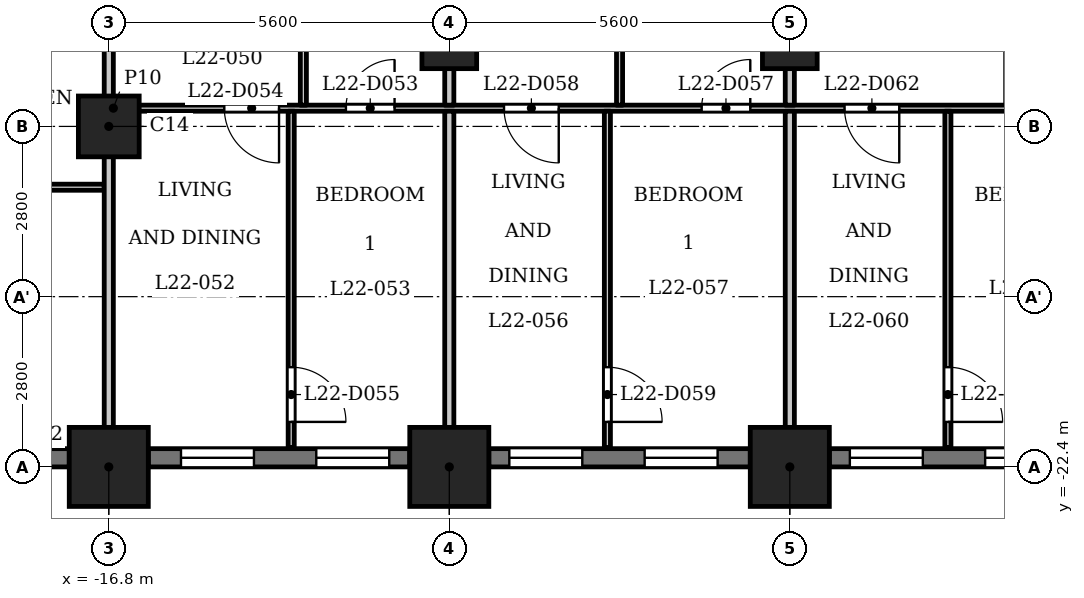
"""IFC4 building model, lengths in metres.
Left out: names, types, materials, properties, quantities, classifications, styles, units other than length and angle.
Written with IfcOpenShell. Run it as: python <this file> out.ifc"""

import sys

from ifc_helpers import new_model, si_unit, direction, frame, frame_2d, origin, origin_2d, place, context, subcontext, project, spatial, rectangle, extrude, element, fill, save


model = new_model("IFC4")
c1 = context("Model", 3, precision=1e-05, world=origin(), true_north=direction((0.0, 1.0)))
c2 = subcontext(c1, "Body", "Model", "MODEL_VIEW")
j1 = project(units=[si_unit("LENGTHUNIT", "METRE"), si_unit("PLANEANGLEUNIT", "RADIAN")], contexts=[c1])
p1 = place(None, origin())
s1 = spatial("IfcSite", under=j1, at=p1, CompositionType="ELEMENT")
p2 = place(p1, origin())
s2 = spatial("IfcBuilding", under=s1, at=p2, CompositionType="ELEMENT")
p3 = place(p2, frame((0.0, 0.0, 90.3)))
s3 = spatial("IfcBuildingStorey", under=s2, at=p3, CompositionType="ELEMENT", Elevation=90.3)
for number, where, z_axis, x_axis in (
    (1, (-16.8, -22.4, 0.0), (0.0, 0.0, 1.0), (1.0, 0.0, 0.0)),
    (2, (-11.2, -22.4, 0.0), (0.0, 0.0, 1.0), (1.0, 0.0, 0.0)),
    (3, (-5.6, -22.4, 0.0), (0.0, 0.0, 1.0), (1.0, 0.0, 0.0)),
):
    element("IfcColumn", number, at=place(p3, frame(where, z_axis=z_axis, x_axis=x_axis)), inside=s3, PredefinedType="COLUMN", context=c2, shape_type="SweptSolid", body=[
        extrude(rectangle(XDim=1.3, YDim=1.3, at=origin_2d()), origin(), (0.0, 0.0, 1.0), 3.5),
    ])
p4 = place(p3, frame((-16.8, -16.8, 0.0), z_axis=(0.0, 0.0, 1.0), x_axis=(1.0, 0.0, 0.0)))
e4 = element("IfcColumn", 4, at=p4, inside=s3, PredefinedType="COLUMN", context=c2, shape_type="SweptSolid", body=[
    extrude(rectangle(XDim=1.0, YDim=1.0, at=origin_2d()), origin(), (0.0, 0.0, 1.0), 3.5),
])
for number, where, z_axis, x_axis in (
    (5, (-11.2, -15.4, 0.0), (0.0, 0.0, 1.0), (1.0, 0.0, 0.0)),
    (6, (-5.6, -15.4, 0.0), (0.0, 0.0, 1.0), (1.0, 0.0, 0.0)),
):
    element("IfcColumn", number, at=place(p3, frame(where, z_axis=z_axis, x_axis=x_axis)), inside=s3, PredefinedType="COLUMN", context=c2, shape_type="SweptSolid", body=[
        extrude(rectangle(XDim=0.9, YDim=0.9, at=origin_2d()), origin(), (0.0, 0.0, 1.0), 3.5),
    ])
p5 = place(p3, frame((-20.0, -22.25, 0.0), z_axis=(0.0, 0.0, 1.0), x_axis=(1.0, 0.0, 0.0)))
e7 = element("IfcWall", 7, at=p5, inside=s3, PredefinedType="SOLIDWALL", context=c2, shape_type="SweptSolid", body=[
    extrude(rectangle(XDim=2.55, YDim=0.3, at=frame_2d((1.275, 0.0))), origin(), (0.0, 0.0, 1.0), 2.4),
])
p6 = place(p5, frame((0.375, 0.0, 0.9)))
e8 = element("IfcOpeningElement", 8, at=p6, cuts=e7, PredefinedType="OPENING", context=c2, shape_type="SweptSolid", body=[
    extrude(rectangle(XDim=1.8, YDim=1.25, at=frame_2d((0.9, 0.625))), frame((0.0, 0.16, 0.0), z_axis=(0.0, -1.0, 0.0), x_axis=(1.0, 0.0, 0.0)), (0.0, 0.0, 1.0), 0.32),
])
p7 = place(p3, frame((-16.15, -22.25, 0.0), z_axis=(0.0, 0.0, 1.0), x_axis=(1.0, 0.0, 0.0)))
e9 = element("IfcWall", 9, at=p7, inside=s3, PredefinedType="SOLIDWALL", context=c2, shape_type="SweptSolid", body=[
    extrude(rectangle(XDim=4.3, YDim=0.3, at=frame_2d((2.15, 0.0))), origin(), (0.0, 0.0, 1.0), 2.4),
])
p8 = place(p7, frame((0.538, 0.0, 0.6)))
e10 = element("IfcOpeningElement", 10, at=p8, cuts=e9, PredefinedType="OPENING", context=c2, shape_type="SweptSolid", body=[
    extrude(rectangle(XDim=1.2, YDim=1.55, at=frame_2d((0.6, 0.775))), frame((0.0, 0.16, 0.0), z_axis=(0.0, -1.0, 0.0), x_axis=(1.0, 0.0, 0.0)), (0.0, 0.0, 1.0), 0.32),
])
p9 = place(p7, frame((2.762, 0.0, 0.6)))
e11 = element("IfcOpeningElement", 11, at=p9, cuts=e9, PredefinedType="OPENING", context=c2, shape_type="SweptSolid", body=[
    extrude(rectangle(XDim=1.2, YDim=1.55, at=frame_2d((0.6, 0.775))), frame((0.0, 0.16, 0.0), z_axis=(0.0, -1.0, 0.0), x_axis=(1.0, 0.0, 0.0)), (0.0, 0.0, 1.0), 0.32),
])
p10 = place(p3, frame((-10.55, -22.25, 0.0), z_axis=(0.0, 0.0, 1.0), x_axis=(1.0, 0.0, 0.0)))
e12 = element("IfcWall", 12, at=p10, inside=s3, PredefinedType="SOLIDWALL", context=c2, shape_type="SweptSolid", body=[
    extrude(rectangle(XDim=4.3, YDim=0.3, at=frame_2d((2.15, 0.0))), origin(), (0.0, 0.0, 1.0), 2.4),
])
p11 = place(p10, frame((0.337, 0.0, 0.6)))
e13 = element("IfcOpeningElement", 13, at=p11, cuts=e12, PredefinedType="OPENING", context=c2, shape_type="SweptSolid", body=[
    extrude(rectangle(XDim=1.2, YDim=1.55, at=frame_2d((0.6, 0.775))), frame((0.0, 0.16, 0.0), z_axis=(0.0, -1.0, 0.0), x_axis=(1.0, 0.0, 0.0)), (0.0, 0.0, 1.0), 0.32),
])
p12 = place(p10, frame((2.562, 0.0, 0.6)))
e14 = element("IfcOpeningElement", 14, at=p12, cuts=e12, PredefinedType="OPENING", context=c2, shape_type="SweptSolid", body=[
    extrude(rectangle(XDim=1.2, YDim=1.55, at=frame_2d((0.6, 0.775))), frame((0.0, 0.16, 0.0), z_axis=(0.0, -1.0, 0.0), x_axis=(1.0, 0.0, 0.0)), (0.0, 0.0, 1.0), 0.32),
])
p13 = place(p3, frame((-4.95, -22.25, 0.0), z_axis=(0.0, 0.0, 1.0), x_axis=(1.0, 0.0, 0.0)))
e15 = element("IfcWall", 15, at=p13, inside=s3, PredefinedType="SOLIDWALL", context=c2, shape_type="SweptSolid", body=[
    extrude(rectangle(XDim=4.3, YDim=0.3, at=frame_2d((2.15, 0.0))), origin(), (0.0, 0.0, 1.0), 2.4),
])
p14 = place(p13, frame((0.337, 0.0, 0.6)))
e16 = element("IfcOpeningElement", 16, at=p14, cuts=e15, PredefinedType="OPENING", context=c2, shape_type="SweptSolid", body=[
    extrude(rectangle(XDim=1.2, YDim=1.55, at=frame_2d((0.6, 0.775))), frame((0.0, 0.16, 0.0), z_axis=(0.0, -1.0, 0.0), x_axis=(1.0, 0.0, 0.0)), (0.0, 0.0, 1.0), 0.32),
])
p15 = place(p13, frame((2.562, 0.0, 0.6)))
e17 = element("IfcOpeningElement", 17, at=p15, cuts=e15, PredefinedType="OPENING", context=c2, shape_type="SweptSolid", body=[
    extrude(rectangle(XDim=1.2, YDim=1.55, at=frame_2d((0.6, 0.775))), frame((0.0, 0.16, 0.0), z_axis=(0.0, -1.0, 0.0), x_axis=(1.0, 0.0, 0.0)), (0.0, 0.0, 1.0), 0.32),
])
p16 = place(p3, frame((-26.394, -17.8, 0.0), z_axis=(0.0, 0.0, 1.0), x_axis=(1.0, 0.0, 0.0)))
e18 = element("IfcWall", 18, at=p16, inside=s3, PredefinedType="PARTITIONING", context=c2, shape_type="SweptSolid", body=[
    extrude(rectangle(XDim=9.519, YDim=0.1, at=frame_2d((4.76, 0.0))), origin(), (0.0, 0.0, 1.0), 3.2),
])
p17 = place(p16, frame((0.794, 0.0, 0.0)))
e19 = element("IfcOpeningElement", 19, at=p17, cuts=e18, PredefinedType="OPENING", context=c2, shape_type="SweptSolid", body=[
    extrude(rectangle(XDim=0.8, YDim=2.1, at=frame_2d((0.4, 1.05))), frame((0.0, 0.06, 0.0), z_axis=(0.0, -1.0, 0.0), x_axis=(1.0, 0.0, 0.0)), (0.0, 0.0, 1.0), 0.12),
])
p18 = place(p16, frame((5.644, 0.0, 0.0)))
e20 = element("IfcOpeningElement", 20, at=p18, cuts=e18, PredefinedType="OPENING", context=c2, shape_type="SweptSolid", body=[
    extrude(rectangle(XDim=0.9, YDim=2.1, at=frame_2d((0.45, 1.05))), frame((0.0, 0.06, 0.0), z_axis=(0.0, -1.0, 0.0), x_axis=(1.0, 0.0, 0.0)), (0.0, 0.0, 1.0), 0.12),
])
p19 = place(p3, frame((-16.725, -16.5, 0.0), z_axis=(0.0, 0.0, 1.0), x_axis=(1.0, 0.0, 0.0)))
e21 = element("IfcWall", 21, at=p19, inside=s3, PredefinedType="PARTITIONING", context=c2, shape_type="SweptSolid", body=[
    extrude(rectangle(XDim=33.45, YDim=0.1, at=frame_2d((16.725, 0.0))), origin(), (0.0, 0.0, 1.0), 3.2),
])
p20 = place(p19, frame((3.825, 0.0, 0.0)))
e22 = element("IfcOpeningElement", 22, at=p20, cuts=e21, PredefinedType="OPENING", context=c2, shape_type="SweptSolid", body=[
    extrude(rectangle(XDim=0.8, YDim=2.1, at=frame_2d((0.4, 1.05))), frame((0.0, 0.06, 0.0), z_axis=(0.0, -1.0, 0.0), x_axis=(1.0, 0.0, 0.0)), (0.0, 0.0, 1.0), 0.12),
])
p21 = place(p19, frame((1.825, 0.0, 0.0)))
e23 = element("IfcOpeningElement", 23, at=p21, cuts=e21, PredefinedType="OPENING", context=c2, shape_type="SweptSolid", body=[
    extrude(rectangle(XDim=0.9, YDim=2.1, at=frame_2d((0.45, 1.05))), frame((0.0, 0.06, 0.0), z_axis=(0.0, -1.0, 0.0), x_axis=(1.0, 0.0, 0.0)), (0.0, 0.0, 1.0), 0.12),
])
p22 = place(p19, frame((9.675, 0.0, 0.0)))
e24 = element("IfcOpeningElement", 24, at=p22, cuts=e21, PredefinedType="OPENING", context=c2, shape_type="SweptSolid", body=[
    extrude(rectangle(XDim=0.8, YDim=2.1, at=frame_2d((0.4, 1.05))), frame((0.0, 0.06, 0.0), z_axis=(0.0, -1.0, 0.0), x_axis=(1.0, 0.0, 0.0)), (0.0, 0.0, 1.0), 0.12),
])
p23 = place(p19, frame((6.425, 0.0, 0.0)))
e25 = element("IfcOpeningElement", 25, at=p23, cuts=e21, PredefinedType="OPENING", context=c2, shape_type="SweptSolid", body=[
    extrude(rectangle(XDim=0.9, YDim=2.1, at=frame_2d((0.45, 1.05))), frame((0.0, 0.06, 0.0), z_axis=(0.0, -1.0, 0.0), x_axis=(1.0, 0.0, 0.0)), (0.0, 0.0, 1.0), 0.12),
])
p24 = place(p19, frame((15.275, 0.0, 0.0)))
e26 = element("IfcOpeningElement", 26, at=p24, cuts=e21, PredefinedType="OPENING", context=c2, shape_type="SweptSolid", body=[
    extrude(rectangle(XDim=0.8, YDim=2.1, at=frame_2d((0.4, 1.05))), frame((0.0, 0.06, 0.0), z_axis=(0.0, -1.0, 0.0), x_axis=(1.0, 0.0, 0.0)), (0.0, 0.0, 1.0), 0.12),
])
p25 = place(p19, frame((12.025, 0.0, 0.0)))
e27 = element("IfcOpeningElement", 27, at=p25, cuts=e21, PredefinedType="OPENING", context=c2, shape_type="SweptSolid", body=[
    extrude(rectangle(XDim=0.9, YDim=2.1, at=frame_2d((0.45, 1.05))), frame((0.0, 0.06, 0.0), z_axis=(0.0, -1.0, 0.0), x_axis=(1.0, 0.0, 0.0)), (0.0, 0.0, 1.0), 0.12),
])
p26 = place(p19, frame((20.875, 0.0, 0.0)))
e28 = element("IfcOpeningElement", 28, at=p26, cuts=e21, PredefinedType="OPENING", context=c2, shape_type="SweptSolid", body=[
    extrude(rectangle(XDim=0.8, YDim=2.1, at=frame_2d((0.4, 1.05))), frame((0.0, 0.06, 0.0), z_axis=(0.0, -1.0, 0.0), x_axis=(1.0, 0.0, 0.0)), (0.0, 0.0, 1.0), 0.12),
])
p27 = place(p19, frame((18.625, 0.0, 0.0)))
e29 = element("IfcOpeningElement", 29, at=p27, cuts=e21, PredefinedType="OPENING", context=c2, shape_type="SweptSolid", body=[
    extrude(rectangle(XDim=0.9, YDim=2.1, at=frame_2d((0.45, 1.05))), frame((0.0, 0.06, 0.0), z_axis=(0.0, -1.0, 0.0), x_axis=(1.0, 0.0, 0.0)), (0.0, 0.0, 1.0), 0.12),
])
p28 = place(p19, frame((23.875, 0.0, 0.0)))
e30 = element("IfcOpeningElement", 30, at=p28, cuts=e21, PredefinedType="OPENING", context=c2, shape_type="SweptSolid", body=[
    extrude(rectangle(XDim=0.8, YDim=2.1, at=frame_2d((0.4, 1.05))), frame((0.0, 0.06, 0.0), z_axis=(0.0, -1.0, 0.0), x_axis=(1.0, 0.0, 0.0)), (0.0, 0.0, 1.0), 0.12),
])
p29 = place(p19, frame((26.225, 0.0, 0.0)))
e31 = element("IfcOpeningElement", 31, at=p29, cuts=e21, PredefinedType="OPENING", context=c2, shape_type="SweptSolid", body=[
    extrude(rectangle(XDim=0.9, YDim=2.1, at=frame_2d((0.45, 1.05))), frame((0.0, 0.06, 0.0), z_axis=(0.0, -1.0, 0.0), x_axis=(1.0, 0.0, 0.0)), (0.0, 0.0, 1.0), 0.12),
])
p30 = place(p19, frame((28.575, 0.0, 0.0)))
e32 = element("IfcOpeningElement", 32, at=p30, cuts=e21, PredefinedType="OPENING", context=c2, shape_type="SweptSolid", body=[
    extrude(rectangle(XDim=0.9, YDim=2.1, at=frame_2d((0.45, 1.05))), frame((0.0, 0.06, 0.0), z_axis=(0.0, -1.0, 0.0), x_axis=(1.0, 0.0, 0.0)), (0.0, 0.0, 1.0), 0.12),
])
p31 = place(p19, frame((30.675, 0.0, 0.0)))
e33 = element("IfcOpeningElement", 33, at=p31, cuts=e21, PredefinedType="OPENING", context=c2, shape_type="SweptSolid", body=[
    extrude(rectangle(XDim=0.9, YDim=2.1, at=frame_2d((0.45, 1.05))), frame((0.0, 0.06, 0.0), z_axis=(0.0, -1.0, 0.0), x_axis=(1.0, 0.0, 0.0)), (0.0, 0.0, 1.0), 0.12),
])
p32 = place(p3, frame((-16.8, -23.03, 0.0), z_axis=(0.0, 0.0, 1.0), x_axis=(0.0, 1.0, 0.0)))
e34 = element("IfcWall", 34, at=p32, inside=s3, PredefinedType="PARTITIONING", context=c2, shape_type="SweptSolid", body=[
    extrude(rectangle(XDim=7.555, YDim=0.15, at=frame_2d((3.777, 0.0))), origin(), (0.0, 0.0, 1.0), 3.2),
])
p33 = place(p3, frame((-13.8, -22.08, 0.0), z_axis=(0.0, 0.0, 1.0), x_axis=(0.0, 1.0, 0.0)))
e35 = element("IfcWall", 35, at=p33, inside=s3, PredefinedType="PARTITIONING", context=c2, shape_type="SweptSolid", body=[
    extrude(rectangle(XDim=5.53, YDim=0.1, at=frame_2d((2.765, 0.0))), origin(), (0.0, 0.0, 1.0), 3.2),
])
p34 = place(p33, frame((0.42, 0.0, 0.0)))
e36 = element("IfcOpeningElement", 36, at=p34, cuts=e35, PredefinedType="OPENING", context=c2, shape_type="SweptSolid", body=[
    extrude(rectangle(XDim=0.9, YDim=2.1, at=frame_2d((0.45, 1.05))), frame((0.0, 0.06, 0.0), z_axis=(0.0, -1.0, 0.0), x_axis=(1.0, 0.0, 0.0)), (0.0, 0.0, 1.0), 0.12),
])
p35 = place(p3, frame((-13.6, -16.45, 0.0), z_axis=(0.0, 0.0, 1.0), x_axis=(0.0, 1.0, 0.0)))
e37 = element("IfcWall", 37, at=p35, inside=s3, PredefinedType="PARTITIONING", context=c2, shape_type="SweptSolid", body=[
    extrude(rectangle(XDim=3.175, YDim=0.1, at=frame_2d((1.587, 0.0))), origin(), (0.0, 0.0, 1.0), 3.2),
])
p36 = place(p3, frame((-11.2, -23.03, 0.0), z_axis=(0.0, 0.0, 1.0), x_axis=(0.0, 1.0, 0.0)))
e38 = element("IfcWall", 38, at=p36, inside=s3, PredefinedType="PARTITIONING", context=c2, shape_type="SweptSolid", body=[
    extrude(rectangle(XDim=6.48, YDim=0.15, at=frame_2d((3.24, 0.0))), origin(), (0.0, 0.0, 1.0), 3.2),
])
p37 = place(p3, frame((-11.2, -16.45, 0.0), z_axis=(0.0, 0.0, 1.0), x_axis=(0.0, 1.0, 0.0)))
e39 = element("IfcWall", 39, at=p37, inside=s3, PredefinedType="PARTITIONING", context=c2, shape_type="SweptSolid", body=[
    extrude(rectangle(XDim=3.175, YDim=0.15, at=frame_2d((1.587, 0.0))), origin(), (0.0, 0.0, 1.0), 3.2),
])
p38 = place(p3, frame((-8.6, -22.08, 0.0), z_axis=(0.0, 0.0, 1.0), x_axis=(0.0, 1.0, 0.0)))
e40 = element("IfcWall", 40, at=p38, inside=s3, PredefinedType="PARTITIONING", context=c2, shape_type="SweptSolid", body=[
    extrude(rectangle(XDim=5.53, YDim=0.1, at=frame_2d((2.765, 0.0))), origin(), (0.0, 0.0, 1.0), 3.2),
])
p39 = place(p38, frame((0.42, 0.0, 0.0)))
e41 = element("IfcOpeningElement", 41, at=p39, cuts=e40, PredefinedType="OPENING", context=c2, shape_type="SweptSolid", body=[
    extrude(rectangle(XDim=0.9, YDim=2.1, at=frame_2d((0.45, 1.05))), frame((0.0, 0.06, 0.0), z_axis=(0.0, -1.0, 0.0), x_axis=(1.0, 0.0, 0.0)), (0.0, 0.0, 1.0), 0.12),
])
p40 = place(p3, frame((-8.4, -16.45, 0.0), z_axis=(0.0, 0.0, 1.0), x_axis=(0.0, 1.0, 0.0)))
e42 = element("IfcWall", 42, at=p40, inside=s3, PredefinedType="PARTITIONING", context=c2, shape_type="SweptSolid", body=[
    extrude(rectangle(XDim=3.175, YDim=0.1, at=frame_2d((1.587, 0.0))), origin(), (0.0, 0.0, 1.0), 3.2),
])
p41 = place(p3, frame((-5.6, -23.03, 0.0), z_axis=(0.0, 0.0, 1.0), x_axis=(0.0, 1.0, 0.0)))
e43 = element("IfcWall", 43, at=p41, inside=s3, PredefinedType="PARTITIONING", context=c2, shape_type="SweptSolid", body=[
    extrude(rectangle(XDim=6.48, YDim=0.15, at=frame_2d((3.24, 0.0))), origin(), (0.0, 0.0, 1.0), 3.2),
])
p42 = place(p3, frame((-5.6, -16.45, 0.0), z_axis=(0.0, 0.0, 1.0), x_axis=(0.0, 1.0, 0.0)))
e44 = element("IfcWall", 44, at=p42, inside=s3, PredefinedType="PARTITIONING", context=c2, shape_type="SweptSolid", body=[
    extrude(rectangle(XDim=3.175, YDim=0.15, at=frame_2d((1.587, 0.0))), origin(), (0.0, 0.0, 1.0), 3.2),
])
p43 = place(p3, frame((-3.0, -22.08, 0.0), z_axis=(0.0, 0.0, 1.0), x_axis=(0.0, 1.0, 0.0)))
e45 = element("IfcWall", 45, at=p43, inside=s3, PredefinedType="PARTITIONING", context=c2, shape_type="SweptSolid", body=[
    extrude(rectangle(XDim=5.53, YDim=0.1, at=frame_2d((2.765, 0.0))), origin(), (0.0, 0.0, 1.0), 3.2),
])
p44 = place(p43, frame((0.42, 0.0, 0.0)))
e46 = element("IfcOpeningElement", 46, at=p44, cuts=e45, PredefinedType="OPENING", context=c2, shape_type="SweptSolid", body=[
    extrude(rectangle(XDim=0.9, YDim=2.1, at=frame_2d((0.45, 1.05))), frame((0.0, 0.06, 0.0), z_axis=(0.0, -1.0, 0.0), x_axis=(1.0, 0.0, 0.0)), (0.0, 0.0, 1.0), 0.12),
])
p45 = place(p20, origin())
e47 = element("IfcDoor", 47, at=p45, inside=s3, OperationType="SINGLE_SWING_LEFT", PredefinedType="DOOR", context=c2, shape_type="SweptSolid", body=[
    extrude(rectangle(XDim=0.8, YDim=2.1, at=frame_2d((0.4, 1.05))), frame((0.0, 0.025, 0.0), z_axis=(0.0, -1.0, 0.0), x_axis=(1.0, 0.0, 0.0)), (0.0, 0.0, 1.0), 0.05),
])
fill(e22, e47)
p46 = place(p21, origin())
e48 = element("IfcDoor", 48, at=p46, inside=s3, OperationType="SINGLE_SWING_RIGHT", PredefinedType="DOOR", context=c2, shape_type="SweptSolid", body=[
    extrude(rectangle(XDim=0.9, YDim=2.1, at=frame_2d((0.45, 1.05))), frame((0.0, 0.025, 0.0), z_axis=(0.0, -1.0, 0.0), x_axis=(1.0, 0.0, 0.0)), (0.0, 0.0, 1.0), 0.05),
])
fill(e23, e48)
p47 = place(p34, origin())
e49 = element("IfcDoor", 49, at=p47, inside=s3, OperationType="SINGLE_SWING_LEFT", PredefinedType="DOOR", context=c2, shape_type="SweptSolid", body=[
    extrude(rectangle(XDim=0.9, YDim=2.1, at=frame_2d((0.45, 1.05))), frame((0.0, 0.025, 0.0), z_axis=(0.0, -1.0, 0.0), x_axis=(1.0, 0.0, 0.0)), (0.0, 0.0, 1.0), 0.05),
])
fill(e36, e49)
p48 = place(p22, origin())
e50 = element("IfcDoor", 50, at=p48, inside=s3, OperationType="SINGLE_SWING_LEFT", PredefinedType="DOOR", context=c2, shape_type="SweptSolid", body=[
    extrude(rectangle(XDim=0.8, YDim=2.1, at=frame_2d((0.4, 1.05))), frame((0.0, 0.025, 0.0), z_axis=(0.0, -1.0, 0.0), x_axis=(1.0, 0.0, 0.0)), (0.0, 0.0, 1.0), 0.05),
])
fill(e24, e50)
p49 = place(p23, origin())
e51 = element("IfcDoor", 51, at=p49, inside=s3, OperationType="SINGLE_SWING_RIGHT", PredefinedType="DOOR", context=c2, shape_type="SweptSolid", body=[
    extrude(rectangle(XDim=0.9, YDim=2.1, at=frame_2d((0.45, 1.05))), frame((0.0, 0.025, 0.0), z_axis=(0.0, -1.0, 0.0), x_axis=(1.0, 0.0, 0.0)), (0.0, 0.0, 1.0), 0.05),
])
fill(e25, e51)
p50 = place(p39, origin())
e52 = element("IfcDoor", 52, at=p50, inside=s3, OperationType="SINGLE_SWING_LEFT", PredefinedType="DOOR", context=c2, shape_type="SweptSolid", body=[
    extrude(rectangle(XDim=0.9, YDim=2.1, at=frame_2d((0.45, 1.05))), frame((0.0, 0.025, 0.0), z_axis=(0.0, -1.0, 0.0), x_axis=(1.0, 0.0, 0.0)), (0.0, 0.0, 1.0), 0.05),
])
fill(e41, e52)
p51 = place(p25, origin())
e53 = element("IfcDoor", 53, at=p51, inside=s3, OperationType="SINGLE_SWING_RIGHT", PredefinedType="DOOR", context=c2, shape_type="SweptSolid", body=[
    extrude(rectangle(XDim=0.9, YDim=2.1, at=frame_2d((0.45, 1.05))), frame((0.0, 0.025, 0.0), z_axis=(0.0, -1.0, 0.0), x_axis=(1.0, 0.0, 0.0)), (0.0, 0.0, 1.0), 0.05),
])
fill(e27, e53)
p52 = place(p44, origin())
e54 = element("IfcDoor", 54, at=p52, inside=s3, OperationType="SINGLE_SWING_LEFT", PredefinedType="DOOR", context=c2, shape_type="SweptSolid", body=[
    extrude(rectangle(XDim=0.9, YDim=2.1, at=frame_2d((0.45, 1.05))), frame((0.0, 0.025, 0.0), z_axis=(0.0, -1.0, 0.0), x_axis=(1.0, 0.0, 0.0)), (0.0, 0.0, 1.0), 0.05),
])
fill(e46, e54)
p53 = place(p8, origin())
e55 = element("IfcWindow", 55, at=p53, inside=s3, PartitioningType="SINGLE_PANEL", PredefinedType="WINDOW", context=c2, shape_type="SweptSolid", body=[
    extrude(rectangle(XDim=1.2, YDim=1.55, at=frame_2d((0.6, 0.775))), frame((0.0, 0.03, 0.0), z_axis=(0.0, -1.0, 0.0), x_axis=(1.0, 0.0, 0.0)), (0.0, 0.0, 1.0), 0.06),
])
fill(e10, e55)
p54 = place(p9, origin())
e56 = element("IfcWindow", 56, at=p54, inside=s3, PartitioningType="SINGLE_PANEL", PredefinedType="WINDOW", context=c2, shape_type="SweptSolid", body=[
    extrude(rectangle(XDim=1.2, YDim=1.55, at=frame_2d((0.6, 0.775))), frame((0.0, 0.03, 0.0), z_axis=(0.0, -1.0, 0.0), x_axis=(1.0, 0.0, 0.0)), (0.0, 0.0, 1.0), 0.06),
])
fill(e11, e56)
p55 = place(p11, origin())
e57 = element("IfcWindow", 57, at=p55, inside=s3, PartitioningType="SINGLE_PANEL", PredefinedType="WINDOW", context=c2, shape_type="SweptSolid", body=[
    extrude(rectangle(XDim=1.2, YDim=1.55, at=frame_2d((0.6, 0.775))), frame((0.0, 0.03, 0.0), z_axis=(0.0, -1.0, 0.0), x_axis=(1.0, 0.0, 0.0)), (0.0, 0.0, 1.0), 0.06),
])
fill(e13, e57)
p56 = place(p12, origin())
e58 = element("IfcWindow", 58, at=p56, inside=s3, PartitioningType="SINGLE_PANEL", PredefinedType="WINDOW", context=c2, shape_type="SweptSolid", body=[
    extrude(rectangle(XDim=1.2, YDim=1.55, at=frame_2d((0.6, 0.775))), frame((0.0, 0.03, 0.0), z_axis=(0.0, -1.0, 0.0), x_axis=(1.0, 0.0, 0.0)), (0.0, 0.0, 1.0), 0.06),
])
fill(e14, e58)
p57 = place(p14, origin())
e59 = element("IfcWindow", 59, at=p57, inside=s3, PartitioningType="SINGLE_PANEL", PredefinedType="WINDOW", context=c2, shape_type="SweptSolid", body=[
    extrude(rectangle(XDim=1.2, YDim=1.55, at=frame_2d((0.6, 0.775))), frame((0.0, 0.03, 0.0), z_axis=(0.0, -1.0, 0.0), x_axis=(1.0, 0.0, 0.0)), (0.0, 0.0, 1.0), 0.06),
])
fill(e16, e59)
p58 = place(p15, origin())
e60 = element("IfcWindow", 60, at=p58, inside=s3, PartitioningType="SINGLE_PANEL", PredefinedType="WINDOW", context=c2, shape_type="SweptSolid", body=[
    extrude(rectangle(XDim=1.2, YDim=1.55, at=frame_2d((0.6, 0.775))), frame((0.0, 0.03, 0.0), z_axis=(0.0, -1.0, 0.0), x_axis=(1.0, 0.0, 0.0)), (0.0, 0.0, 1.0), 0.06),
])
fill(e17, e60)
save(model, sys.argv[1])
